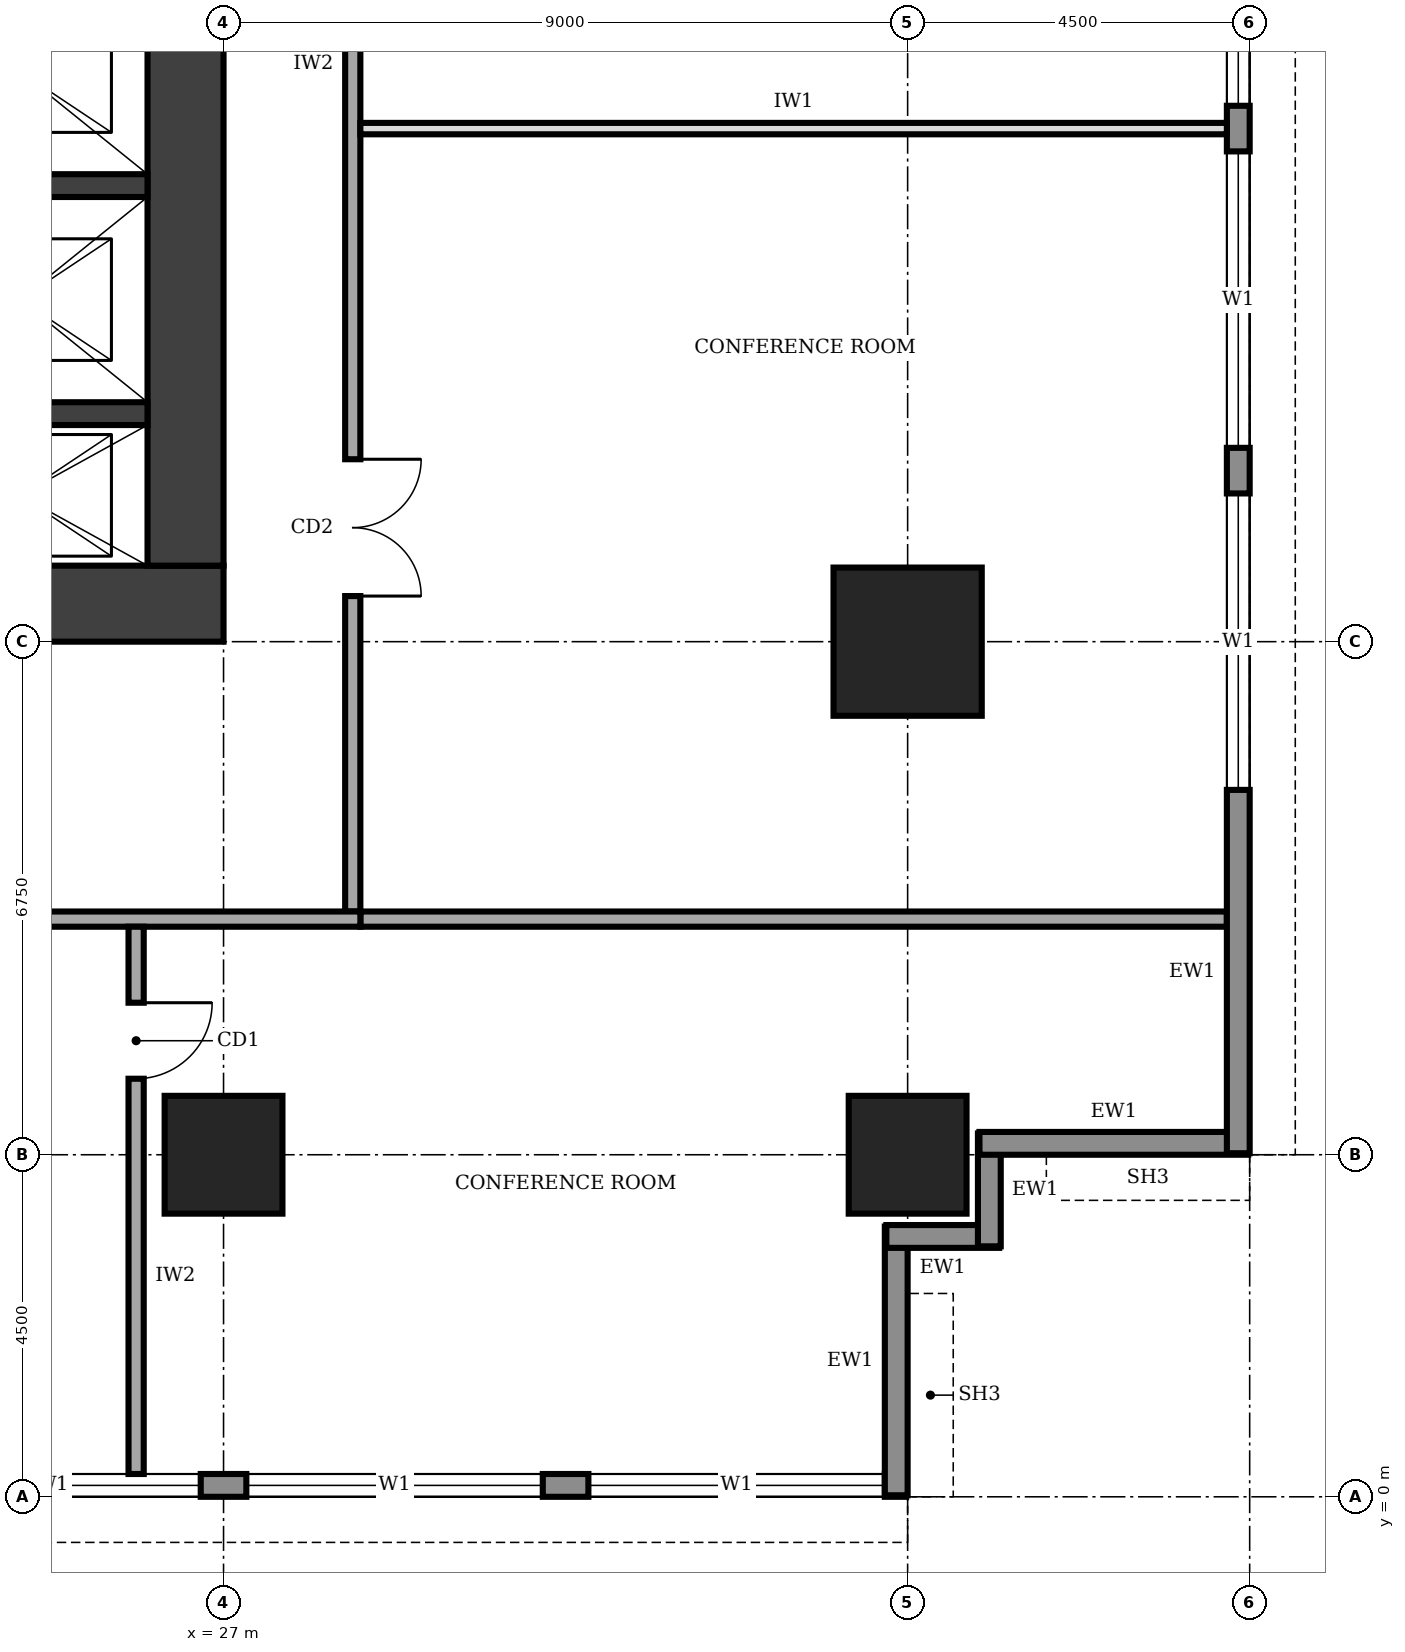
"""IFC4 building model, lengths in metres.
Left out: names, types, materials, properties, quantities, classifications, styles, units other than length and angle.
Written with IfcOpenShell. Run it as: python <this file> out.ifc"""

import sys

from ifc_helpers import new_model, si_unit, direction, frame, frame_2d, origin, origin_2d, place, context, subcontext, project, spatial, rectangle, extrude, element, fill, save


model = new_model("IFC4")
c1 = context("Model", 3, precision=1e-05, world=origin(), true_north=direction((0.0, 1.0)))
c2 = subcontext(c1, "Body", "Model", "MODEL_VIEW")
j1 = project(units=[si_unit("LENGTHUNIT", "METRE"), si_unit("PLANEANGLEUNIT", "RADIAN")], contexts=[c1])
p1 = place(None, origin())
s1 = spatial("IfcSite", under=j1, at=p1, CompositionType="ELEMENT")
p2 = place(p1, origin())
s2 = spatial("IfcBuilding", under=s1, at=p2, CompositionType="ELEMENT")
p3 = place(p2, frame((0.0, 0.0, 209.0)))
s3 = spatial("IfcBuildingStorey", under=s2, at=p3, CompositionType="ELEMENT", Elevation=209.0)
p4 = place(p3, frame((13.5, 11.75, 0.0), z_axis=(0.0, 0.0, 1.0), x_axis=(1.0, 0.0, 0.0)))
e1 = element("IfcWall", 1, at=p4, inside=s3, PredefinedType="SHEAR", context=c2, shape_type="SweptSolid", body=[
    extrude(rectangle(XDim=13.5, YDim=1.0, at=frame_2d((6.75, 0.0))), origin(), (0.0, 0.0, 1.0), 4.0),
])
p5 = place(p4, frame((4.75, 0.0, 0.0)))
e2 = element("IfcOpeningElement", 2, at=p5, cuts=e1, PredefinedType="OPENING", context=c2, shape_type="SweptSolid", body=[
    extrude(rectangle(XDim=1.0, YDim=2.1, at=frame_2d((0.5, 1.05))), frame((0.0, 0.51, 0.0), z_axis=(0.0, -1.0, 0.0), x_axis=(1.0, 0.0, 0.0)), (0.0, 0.0, 1.0), 1.02),
])
p6 = place(p3, frame((26.5, 12.25, 0.0), z_axis=(0.0, 0.0, 1.0), x_axis=(0.0, 1.0, 0.0)))
e3 = element("IfcWall", 3, at=p6, inside=s3, PredefinedType="SHEAR", context=c2, shape_type="SweptSolid", body=[
    extrude(rectangle(XDim=16.0, YDim=1.0, at=frame_2d((8.0, 0.0))), origin(), (0.0, 0.0, 1.0), 4.0),
])
for number, where, z_axis, x_axis in (
    (4, (22.65, 14.25, 0.0), (0.0, 0.0, 1.0), (1.0, 0.0, 0.0)),
    (5, (22.65, 17.25, 0.0), (0.0, 0.0, 1.0), (1.0, 0.0, 0.0)),
):
    element("IfcWall", number, at=place(p3, frame(where, z_axis=z_axis, x_axis=x_axis)), inside=s3, PredefinedType="SHEAR", context=c2, shape_type="SweptSolid", body=[
        extrude(rectangle(XDim=3.35, YDim=0.3, at=frame_2d((1.675, 0.0))), origin(), (0.0, 0.0, 1.0), 4.0),
    ])
for number, where, z_axis, x_axis in (
    (6, (27.0, 4.5, 0.0), (0.0, 0.0, 1.0), (1.0, 0.0, 0.0)),
    (7, (36.0, 4.5, 0.0), (0.0, 0.0, 1.0), (1.0, 0.0, 0.0)),
):
    element("IfcColumn", number, at=place(p3, frame(where, z_axis=z_axis, x_axis=x_axis)), inside=s3, PredefinedType="COLUMN", context=c2, shape_type="SweptSolid", body=[
        extrude(rectangle(XDim=1.55, YDim=1.55, at=origin_2d()), origin(), (0.0, 0.0, 1.0), 4.0),
    ])
p7 = place(p3, frame((36.0, 11.25, 0.0), z_axis=(0.0, 0.0, 1.0), x_axis=(1.0, 0.0, 0.0)))
e8 = element("IfcColumn", 8, at=p7, inside=s3, PredefinedType="COLUMN", context=c2, shape_type="SweptSolid", body=[
    extrude(rectangle(XDim=1.95, YDim=1.95, at=origin_2d()), origin(), (0.0, 0.0, 1.0), 4.0),
])
p8 = place(p3, frame((4.52, 0.15, 0.0), z_axis=(0.0, 0.0, 1.0), x_axis=(1.0, 0.0, 0.0)))
e9 = element("IfcWall", 9, at=p8, inside=s3, PredefinedType="STANDARD", context=c2, shape_type="SweptSolid", body=[
    extrude(rectangle(XDim=31.46, YDim=0.3, at=frame_2d((15.73, 0.0))), origin(), (0.0, 0.0, 1.0), 3.75),
])
p9 = place(p8, frame((4.78, 0.0, 0.9)))
e10 = element("IfcOpeningElement", 10, at=p9, cuts=e9, PredefinedType="OPENING", context=c2, shape_type="SweptSolid", body=[
    extrude(rectangle(XDim=3.9, YDim=2.2, at=frame_2d((1.95, 1.1))), frame((0.0, 0.16, 0.0), z_axis=(0.0, -1.0, 0.0), x_axis=(1.0, 0.0, 0.0)), (0.0, 0.0, 1.0), 0.32),
])
p10 = place(p8, frame((9.28, 0.0, 0.9)))
e11 = element("IfcOpeningElement", 11, at=p10, cuts=e9, PredefinedType="OPENING", context=c2, shape_type="SweptSolid", body=[
    extrude(rectangle(XDim=3.9, YDim=2.2, at=frame_2d((1.95, 1.1))), frame((0.0, 0.16, 0.0), z_axis=(0.0, -1.0, 0.0), x_axis=(1.0, 0.0, 0.0)), (0.0, 0.0, 1.0), 0.32),
])
p11 = place(p8, frame((13.78, 0.0, 0.9)))
e12 = element("IfcOpeningElement", 12, at=p11, cuts=e9, PredefinedType="OPENING", context=c2, shape_type="SweptSolid", body=[
    extrude(rectangle(XDim=3.9, YDim=2.2, at=frame_2d((1.95, 1.1))), frame((0.0, 0.16, 0.0), z_axis=(0.0, -1.0, 0.0), x_axis=(1.0, 0.0, 0.0)), (0.0, 0.0, 1.0), 0.32),
])
p12 = place(p8, frame((18.28, 0.0, 0.9)))
e13 = element("IfcOpeningElement", 13, at=p12, cuts=e9, PredefinedType="OPENING", context=c2, shape_type="SweptSolid", body=[
    extrude(rectangle(XDim=3.9, YDim=2.2, at=frame_2d((1.95, 1.1))), frame((0.0, 0.16, 0.0), z_axis=(0.0, -1.0, 0.0), x_axis=(1.0, 0.0, 0.0)), (0.0, 0.0, 1.0), 0.32),
])
p13 = place(p8, frame((22.78, 0.0, 0.9)))
e14 = element("IfcOpeningElement", 14, at=p13, cuts=e9, PredefinedType="OPENING", context=c2, shape_type="SweptSolid", body=[
    extrude(rectangle(XDim=3.9, YDim=2.2, at=frame_2d((1.95, 1.1))), frame((0.0, 0.16, 0.0), z_axis=(0.0, -1.0, 0.0), x_axis=(1.0, 0.0, 0.0)), (0.0, 0.0, 1.0), 0.32),
])
p14 = place(p8, frame((27.28, 0.0, 0.9)))
e15 = element("IfcOpeningElement", 15, at=p14, cuts=e9, PredefinedType="OPENING", context=c2, shape_type="SweptSolid", body=[
    extrude(rectangle(XDim=3.9, YDim=2.2, at=frame_2d((1.95, 1.1))), frame((0.0, 0.16, 0.0), z_axis=(0.0, -1.0, 0.0), x_axis=(1.0, 0.0, 0.0)), (0.0, 0.0, 1.0), 0.32),
])
p15 = place(p3, frame((35.85, 0.02, 0.0), z_axis=(0.0, 0.0, 1.0), x_axis=(0.0, 1.0, 0.0)))
e16 = element("IfcWall", 16, at=p15, inside=s3, PredefinedType="STANDARD", context=c2, shape_type="SweptSolid", body=[
    extrude(rectangle(XDim=3.535, YDim=0.3, at=frame_2d((1.768, 0.0))), origin(), (0.0, 0.0, 1.0), 2.85),
])
for number, where, z_axis, x_axis in (
    (17, (35.72, 3.425, 0.0), (0.0, 0.0, 1.0), (1.0, 0.0, 0.0)),
    (18, (37.075, 3.295, 0.0), (0.0, 0.0, 1.0), (0.0, 1.0, 0.0)),
):
    element("IfcWall", number, at=place(p3, frame(where, z_axis=z_axis, x_axis=x_axis)), inside=s3, PredefinedType="STANDARD", context=c2, shape_type="SweptSolid", body=[
        extrude(rectangle(XDim=1.485, YDim=0.3, at=frame_2d((0.743, 0.0))), origin(), (0.0, 0.0, 1.0), 3.75),
    ])
p16 = place(p3, frame((36.945, 4.65, 0.0), z_axis=(0.0, 0.0, 1.0), x_axis=(1.0, 0.0, 0.0)))
e19 = element("IfcWall", 19, at=p16, inside=s3, PredefinedType="STANDARD", context=c2, shape_type="SweptSolid", body=[
    extrude(rectangle(XDim=3.535, YDim=0.3, at=frame_2d((1.768, 0.0))), origin(), (0.0, 0.0, 1.0), 2.85),
])
p17 = place(p3, frame((40.35, 4.52, 0.0), z_axis=(0.0, 0.0, 1.0), x_axis=(0.0, 1.0, 0.0)))
e20 = element("IfcWall", 20, at=p17, inside=s3, PredefinedType="STANDARD", context=c2, shape_type="SweptSolid", body=[
    extrude(rectangle(XDim=31.46, YDim=0.3, at=frame_2d((15.73, 0.0))), origin(), (0.0, 0.0, 1.0), 3.75),
])
p18 = place(p17, frame((4.78, 0.0, 0.9)))
e21 = element("IfcOpeningElement", 21, at=p18, cuts=e20, PredefinedType="OPENING", context=c2, shape_type="SweptSolid", body=[
    extrude(rectangle(XDim=3.9, YDim=2.2, at=frame_2d((1.95, 1.1))), frame((0.0, 0.16, 0.0), z_axis=(0.0, -1.0, 0.0), x_axis=(1.0, 0.0, 0.0)), (0.0, 0.0, 1.0), 0.32),
])
p19 = place(p17, frame((9.28, 0.0, 0.9)))
e22 = element("IfcOpeningElement", 22, at=p19, cuts=e20, PredefinedType="OPENING", context=c2, shape_type="SweptSolid", body=[
    extrude(rectangle(XDim=3.9, YDim=2.2, at=frame_2d((1.95, 1.1))), frame((0.0, 0.16, 0.0), z_axis=(0.0, -1.0, 0.0), x_axis=(1.0, 0.0, 0.0)), (0.0, 0.0, 1.0), 0.32),
])
p20 = place(p17, frame((13.78, 0.0, 0.9)))
e23 = element("IfcOpeningElement", 23, at=p20, cuts=e20, PredefinedType="OPENING", context=c2, shape_type="SweptSolid", body=[
    extrude(rectangle(XDim=3.9, YDim=2.2, at=frame_2d((1.95, 1.1))), frame((0.0, 0.16, 0.0), z_axis=(0.0, -1.0, 0.0), x_axis=(1.0, 0.0, 0.0)), (0.0, 0.0, 1.0), 0.32),
])
p21 = place(p17, frame((18.28, 0.0, 0.9)))
e24 = element("IfcOpeningElement", 24, at=p21, cuts=e20, PredefinedType="OPENING", context=c2, shape_type="SweptSolid", body=[
    extrude(rectangle(XDim=3.9, YDim=2.2, at=frame_2d((1.95, 1.1))), frame((0.0, 0.16, 0.0), z_axis=(0.0, -1.0, 0.0), x_axis=(1.0, 0.0, 0.0)), (0.0, 0.0, 1.0), 0.32),
])
p22 = place(p17, frame((22.78, 0.0, 0.9)))
e25 = element("IfcOpeningElement", 25, at=p22, cuts=e20, PredefinedType="OPENING", context=c2, shape_type="SweptSolid", body=[
    extrude(rectangle(XDim=3.9, YDim=2.2, at=frame_2d((1.95, 1.1))), frame((0.0, 0.16, 0.0), z_axis=(0.0, -1.0, 0.0), x_axis=(1.0, 0.0, 0.0)), (0.0, 0.0, 1.0), 0.32),
])
p23 = place(p17, frame((27.28, 0.0, 0.9)))
e26 = element("IfcOpeningElement", 26, at=p23, cuts=e20, PredefinedType="OPENING", context=c2, shape_type="SweptSolid", body=[
    extrude(rectangle(XDim=3.9, YDim=2.2, at=frame_2d((1.95, 1.1))), frame((0.0, 0.16, 0.0), z_axis=(0.0, -1.0, 0.0), x_axis=(1.0, 0.0, 0.0)), (0.0, 0.0, 1.0), 0.32),
])
p24 = place(p3, frame((11.9, 7.6, 0.0), z_axis=(0.0, 0.0, 1.0), x_axis=(1.0, 0.0, 0.0)))
e27 = element("IfcWall", 27, at=p24, inside=s3, PredefinedType="SOLIDWALL", context=c2, shape_type="SweptSolid", body=[
    extrude(rectangle(XDim=16.9, YDim=0.2, at=frame_2d((8.45, 0.0))), origin(), (0.0, 0.0, 1.0), 3.75),
])
p25 = place(p3, frame((28.7, 7.7, 0.0), z_axis=(0.0, 0.0, 1.0), x_axis=(0.0, 1.0, 0.0)))
e28 = element("IfcWall", 28, at=p25, inside=s3, PredefinedType="SOLIDWALL", context=c2, shape_type="SweptSolid", body=[
    extrude(rectangle(XDim=23.8, YDim=0.2, at=frame_2d((11.9, 0.0))), origin(), (0.0, 0.0, 1.0), 3.75),
])
p26 = place(p25, frame((4.15, 0.0, 0.0)))
e29 = element("IfcOpeningElement", 29, at=p26, cuts=e28, PredefinedType="OPENING", context=c2, shape_type="SweptSolid", body=[
    extrude(rectangle(XDim=1.8, YDim=2.1, at=frame_2d((0.9, 1.05))), frame((0.0, 0.11, 0.0), z_axis=(0.0, -1.0, 0.0), x_axis=(1.0, 0.0, 0.0)), (0.0, 0.0, 1.0), 0.22),
])
p27 = place(p25, frame((16.35, 0.0, 0.0)))
e30 = element("IfcOpeningElement", 30, at=p27, cuts=e28, PredefinedType="OPENING", context=c2, shape_type="SweptSolid", body=[
    extrude(rectangle(XDim=1.4, YDim=2.1, at=frame_2d((0.7, 1.05))), frame((0.0, 0.11, 0.0), z_axis=(0.0, -1.0, 0.0), x_axis=(1.0, 0.0, 0.0)), (0.0, 0.0, 1.0), 0.22),
])
p28 = place(p3, frame((25.85, 7.5, 0.0), z_axis=(0.0, 0.0, 1.0), x_axis=(0.0, -1.0, 0.0)))
e31 = element("IfcWall", 31, at=p28, inside=s3, PredefinedType="SOLIDWALL", context=c2, shape_type="SweptSolid", body=[
    extrude(rectangle(XDim=7.2, YDim=0.2, at=frame_2d((3.6, 0.0))), origin(), (0.0, 0.0, 1.0), 3.75),
])
p29 = place(p28, frame((1.0, 0.0, 0.0)))
e32 = element("IfcOpeningElement", 32, at=p29, cuts=e31, PredefinedType="OPENING", context=c2, shape_type="SweptSolid", body=[
    extrude(rectangle(XDim=1.0, YDim=2.1, at=frame_2d((0.5, 1.05))), frame((0.0, 0.11, 0.0), z_axis=(0.0, -1.0, 0.0), x_axis=(1.0, 0.0, 0.0)), (0.0, 0.0, 1.0), 0.22),
])
p30 = place(p3, frame((28.8, 7.6, 0.0), z_axis=(0.0, 0.0, 1.0), x_axis=(1.0, 0.0, 0.0)))
e33 = element("IfcWall", 33, at=p30, inside=s3, PredefinedType="SOLIDWALL", context=c2, shape_type="SweptSolid", body=[
    extrude(rectangle(XDim=11.4, YDim=0.2, at=frame_2d((5.7, 0.0))), origin(), (0.0, 0.0, 1.0), 3.75),
])
p31 = place(p3, frame((28.8, 18.0, 0.0), z_axis=(0.0, 0.0, 1.0), x_axis=(1.0, 0.0, 0.0)))
e34 = element("IfcWall", 34, at=p31, inside=s3, PredefinedType="PARTITIONING", context=c2, shape_type="SweptSolid", body=[
    extrude(rectangle(XDim=11.4, YDim=0.15, at=frame_2d((5.7, 0.0))), origin(), (0.0, 0.0, 1.0), 3.75),
])
p32 = place(p12, origin())
e35 = element("IfcWindow", 35, at=p32, inside=s3, PartitioningType="SINGLE_PANEL", PredefinedType="WINDOW", context=c2, shape_type="SweptSolid", body=[
    extrude(rectangle(XDim=3.9, YDim=2.2, at=frame_2d((1.95, 1.1))), frame((0.0, 0.03, 0.0), z_axis=(0.0, -1.0, 0.0), x_axis=(1.0, 0.0, 0.0)), (0.0, 0.0, 1.0), 0.06),
])
fill(e13, e35)
p33 = place(p13, origin())
e36 = element("IfcWindow", 36, at=p33, inside=s3, PartitioningType="SINGLE_PANEL", PredefinedType="WINDOW", context=c2, shape_type="SweptSolid", body=[
    extrude(rectangle(XDim=3.9, YDim=2.2, at=frame_2d((1.95, 1.1))), frame((0.0, 0.03, 0.0), z_axis=(0.0, -1.0, 0.0), x_axis=(1.0, 0.0, 0.0)), (0.0, 0.0, 1.0), 0.06),
])
fill(e14, e36)
p34 = place(p14, origin())
e37 = element("IfcWindow", 37, at=p34, inside=s3, PartitioningType="SINGLE_PANEL", PredefinedType="WINDOW", context=c2, shape_type="SweptSolid", body=[
    extrude(rectangle(XDim=3.9, YDim=2.2, at=frame_2d((1.95, 1.1))), frame((0.0, 0.03, 0.0), z_axis=(0.0, -1.0, 0.0), x_axis=(1.0, 0.0, 0.0)), (0.0, 0.0, 1.0), 0.06),
])
fill(e15, e37)
p35 = place(p18, origin())
e38 = element("IfcWindow", 38, at=p35, inside=s3, PartitioningType="SINGLE_PANEL", PredefinedType="WINDOW", context=c2, shape_type="SweptSolid", body=[
    extrude(rectangle(XDim=3.9, YDim=2.2, at=frame_2d((1.95, 1.1))), frame((0.0, 0.03, 0.0), z_axis=(0.0, -1.0, 0.0), x_axis=(1.0, 0.0, 0.0)), (0.0, 0.0, 1.0), 0.06),
])
fill(e21, e38)
p36 = place(p19, origin())
e39 = element("IfcWindow", 39, at=p36, inside=s3, PartitioningType="SINGLE_PANEL", PredefinedType="WINDOW", context=c2, shape_type="SweptSolid", body=[
    extrude(rectangle(XDim=3.9, YDim=2.2, at=frame_2d((1.95, 1.1))), frame((0.0, 0.03, 0.0), z_axis=(0.0, -1.0, 0.0), x_axis=(1.0, 0.0, 0.0)), (0.0, 0.0, 1.0), 0.06),
])
fill(e22, e39)
p37 = place(p20, origin())
e40 = element("IfcWindow", 40, at=p37, inside=s3, PartitioningType="SINGLE_PANEL", PredefinedType="WINDOW", context=c2, shape_type="SweptSolid", body=[
    extrude(rectangle(XDim=3.9, YDim=2.2, at=frame_2d((1.95, 1.1))), frame((0.0, 0.03, 0.0), z_axis=(0.0, -1.0, 0.0), x_axis=(1.0, 0.0, 0.0)), (0.0, 0.0, 1.0), 0.06),
])
fill(e23, e40)
p38 = place(p26, frame((1.8, 0.0, 0.0), z_axis=(0.0, 0.0, 1.0), x_axis=(-1.0, 0.0, 0.0)))
e41 = element("IfcDoor", 41, at=p38, inside=s3, OperationType="DOUBLE_DOOR_SINGLE_SWING", PredefinedType="DOOR", context=c2, shape_type="SweptSolid", body=[
    extrude(rectangle(XDim=1.8, YDim=2.1, at=frame_2d((0.9, 1.05))), frame((0.0, 0.025, 0.0), z_axis=(0.0, -1.0, 0.0), x_axis=(1.0, 0.0, 0.0)), (0.0, 0.0, 1.0), 0.05),
])
fill(e29, e41)
p39 = place(p29, origin())
e42 = element("IfcDoor", 42, at=p39, inside=s3, OperationType="SINGLE_SWING_LEFT", PredefinedType="DOOR", context=c2, shape_type="SweptSolid", body=[
    extrude(rectangle(XDim=1.0, YDim=2.1, at=frame_2d((0.5, 1.05))), frame((0.0, 0.025, 0.0), z_axis=(0.0, -1.0, 0.0), x_axis=(1.0, 0.0, 0.0)), (0.0, 0.0, 1.0), 0.05),
])
fill(e32, e42)
save(model, sys.argv[1])
